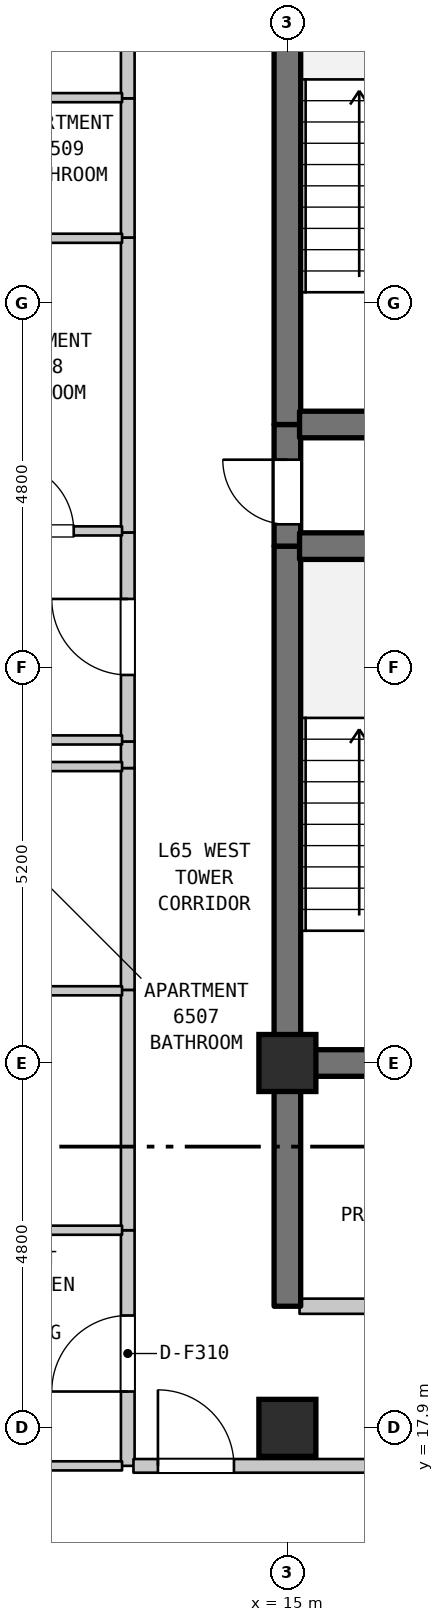
"""IFC4 building model, lengths in metres.
Left out: names, types, materials, properties, quantities, classifications, styles, units other than length and angle.
Written with IfcOpenShell. Run it as: python <this file> out.ifc"""

import sys

from ifc_helpers import new_model, si_unit, direction, frame, frame_2d, origin, origin_2d, place, context, subcontext, project, spatial, rectangle, extrude, element, fill, save


model = new_model("IFC4")
c1 = context("Model", 3, precision=1e-05, world=origin(), true_north=direction((0.0, 1.0)))
c2 = subcontext(c1, "Body", "Model", "MODEL_VIEW")
j1 = project(units=[si_unit("LENGTHUNIT", "METRE"), si_unit("PLANEANGLEUNIT", "RADIAN")], contexts=[c1])
p1 = place(None, origin())
s1 = spatial("IfcSite", under=j1, at=p1, CompositionType="ELEMENT")
p2 = place(p1, origin())
s2 = spatial("IfcBuilding", under=s1, at=p2, CompositionType="ELEMENT")
p3 = place(p2, frame((0.0, 0.0, 262.1)))
s3 = spatial("IfcBuildingStorey", under=s2, at=p3, CompositionType="ELEMENT", Elevation=262.1)
for number, where, z_axis, x_axis in (
    (1, (15.0, 17.9, 0.0), (0.0, 0.0, 1.0), (1.0, 0.0, 0.0)),
    (2, (15.0, 22.7, 0.0), (0.0, 0.0, 1.0), (1.0, 0.0, 0.0)),
):
    element("IfcColumn", number, at=place(p3, frame(where, z_axis=z_axis, x_axis=x_axis)), inside=s3, PredefinedType="COLUMN", context=c2, shape_type="SweptSolid", body=[
        extrude(rectangle(XDim=0.75, YDim=0.75, at=origin_2d()), origin(), (0.0, 0.0, 1.0), 3.7),
    ])
p4 = place(p3, frame((12.9, 17.4, 0.0), z_axis=(0.0, 0.0, 1.0), x_axis=(0.0, 1.0, 0.0)))
e3 = element("IfcWall", 3, at=p4, inside=s3, PredefinedType="STANDARD", context=c2, shape_type="SweptSolid", body=[
    extrude(rectangle(XDim=3.1, YDim=0.18, at=frame_2d((1.55, 0.0))), origin(), (0.0, 0.0, 1.0), 3.39),
])
p5 = place(p4, frame((0.978, 0.0, 0.0)))
e4 = element("IfcOpeningElement", 4, at=p5, cuts=e3, PredefinedType="OPENING", context=c2, shape_type="SweptSolid", body=[
    extrude(rectangle(XDim=1.0, YDim=2.15, at=frame_2d((0.5, 1.075))), frame((0.0, 0.1, 0.0), z_axis=(0.0, -1.0, 0.0), x_axis=(1.0, 0.0, 0.0)), (0.0, 0.0, 1.0), 0.2),
])
p6 = place(p3, frame((12.9, 20.5, 0.0), z_axis=(0.0, 0.0, 1.0), x_axis=(0.0, 1.0, 0.0)))
e5 = element("IfcWall", 5, at=p6, inside=s3, PredefinedType="STANDARD", context=c2, shape_type="SweptSolid", body=[
    extrude(rectangle(XDim=3.162, YDim=0.18, at=frame_2d((1.581, 0.0))), origin(), (0.0, 0.0, 1.0), 3.39),
])
p7 = place(p3, frame((12.9, 23.662, 0.0), z_axis=(0.0, 0.0, 1.0), x_axis=(0.0, 1.0, 0.0)))
e6 = element("IfcWall", 6, at=p7, inside=s3, PredefinedType="STANDARD", context=c2, shape_type="SweptSolid", body=[
    extrude(rectangle(XDim=2.918, YDim=0.18, at=frame_2d((1.459, 0.0))), origin(), (0.0, 0.0, 1.0), 3.39),
])
p8 = place(p3, frame((12.9, 26.58, 0.0), z_axis=(0.0, 0.0, 1.0), x_axis=(0.0, 1.0, 0.0)))
e7 = element("IfcWall", 7, at=p8, inside=s3, PredefinedType="STANDARD", context=c2, shape_type="SweptSolid", body=[
    extrude(rectangle(XDim=0.35, YDim=0.18, at=frame_2d((0.175, 0.0))), origin(), (0.0, 0.0, 1.0), 3.39),
])
p9 = place(p3, frame((12.9, 26.93, 0.0), z_axis=(0.0, 0.0, 1.0), x_axis=(0.0, 1.0, 0.0)))
e8 = element("IfcWall", 8, at=p9, inside=s3, PredefinedType="STANDARD", context=c2, shape_type="SweptSolid", body=[
    extrude(rectangle(XDim=2.75, YDim=0.18, at=frame_2d((1.375, 0.0))), origin(), (0.0, 0.0, 1.0), 3.39),
])
p10 = place(p9, frame((0.875, 0.0, 0.0)))
e9 = element("IfcOpeningElement", 9, at=p10, cuts=e8, PredefinedType="OPENING", context=c2, shape_type="SweptSolid", body=[
    extrude(rectangle(XDim=1.0, YDim=2.15, at=frame_2d((0.5, 1.075))), frame((0.0, 0.1, 0.0), z_axis=(0.0, -1.0, 0.0), x_axis=(1.0, 0.0, 0.0)), (0.0, 0.0, 1.0), 0.2),
])
p11 = place(p3, frame((12.9, 29.68, 0.0), z_axis=(0.0, 0.0, 1.0), x_axis=(0.0, 1.0, 0.0)))
e10 = element("IfcWall", 10, at=p11, inside=s3, PredefinedType="STANDARD", context=c2, shape_type="SweptSolid", body=[
    extrude(rectangle(XDim=3.88, YDim=0.18, at=frame_2d((1.94, 0.0))), origin(), (0.0, 0.0, 1.0), 3.39),
])
p12 = place(p3, frame((12.9, 33.56, 0.0), z_axis=(0.0, 0.0, 1.0), x_axis=(0.0, 1.0, 0.0)))
e11 = element("IfcWall", 11, at=p12, inside=s3, PredefinedType="STANDARD", context=c2, shape_type="SweptSolid", body=[
    extrude(rectangle(XDim=1.831, YDim=0.18, at=frame_2d((0.916, 0.0))), origin(), (0.0, 0.0, 1.0), 3.39),
])
p13 = place(p3, frame((12.9, 35.391, 0.0), z_axis=(0.0, 0.0, 1.0), x_axis=(0.0, 1.0, 0.0)))
e12 = element("IfcWall", 12, at=p13, inside=s3, PredefinedType="STANDARD", context=c2, shape_type="SweptSolid", body=[
    extrude(rectangle(XDim=1.831, YDim=0.18, at=frame_2d((0.916, 0.0))), origin(), (0.0, 0.0, 1.0), 3.39),
])
p14 = place(p3, frame((15.0, 19.5, 0.0), z_axis=(0.0, 0.0, 1.0), x_axis=(0.0, 1.0, 0.0)))
e13 = element("IfcWall", 13, at=p14, inside=s3, PredefinedType="SHEAR", context=c2, shape_type="SweptSolid", body=[
    extrude(rectangle(XDim=3.2, YDim=0.35, at=frame_2d((1.6, 0.0))), origin(), (0.0, 0.0, 1.0), 3.39),
])
p15 = place(p3, frame((15.0, 22.7, 0.0), z_axis=(0.0, 0.0, 1.0), x_axis=(0.0, 1.0, 0.0)))
e14 = element("IfcWall", 14, at=p15, inside=s3, PredefinedType="SHEAR", context=c2, shape_type="SweptSolid", body=[
    extrude(rectangle(XDim=6.8, YDim=0.35, at=frame_2d((3.4, 0.0))), origin(), (0.0, 0.0, 1.0), 3.39),
])
p16 = place(p3, frame((15.0, 29.5, 0.0), z_axis=(0.0, 0.0, 1.0), x_axis=(0.0, 1.0, 0.0)))
e15 = element("IfcWall", 15, at=p16, inside=s3, PredefinedType="SHEAR", context=c2, shape_type="SweptSolid", body=[
    extrude(rectangle(XDim=1.6, YDim=0.35, at=frame_2d((0.8, 0.0))), origin(), (0.0, 0.0, 1.0), 3.39),
])
p17 = place(p16, frame((0.287, 0.0, 0.0)))
e16 = element("IfcOpeningElement", 16, at=p17, cuts=e15, PredefinedType="OPENING", context=c2, shape_type="SweptSolid", body=[
    extrude(rectangle(XDim=0.85, YDim=2.1, at=frame_2d((0.425, 1.05))), frame((0.0, 0.185, 0.0), z_axis=(0.0, -1.0, 0.0), x_axis=(1.0, 0.0, 0.0)), (0.0, 0.0, 1.0), 0.37),
])
p18 = place(p3, frame((15.0, 31.1, 0.0), z_axis=(0.0, 0.0, 1.0), x_axis=(0.0, 1.0, 0.0)))
e17 = element("IfcWall", 17, at=p18, inside=s3, PredefinedType="SHEAR", context=c2, shape_type="SweptSolid", body=[
    extrude(rectangle(XDim=6.8, YDim=0.35, at=frame_2d((3.4, 0.0))), origin(), (0.0, 0.0, 1.0), 3.39),
])
p19 = place(p3, frame((8.973, 17.4, 0.0), z_axis=(0.0, 0.0, 1.0), x_axis=(1.0, 0.0, 0.0)))
e18 = element("IfcWall", 18, at=p19, inside=s3, PredefinedType="PARTITIONING", context=c2, shape_type="SweptSolid", body=[
    extrude(rectangle(XDim=3.852, YDim=0.12, at=frame_2d((1.926, 0.0))), origin(), (0.0, 0.0, 1.0), 3.39),
])
p20 = place(p3, frame((12.975, 17.4, 0.0), z_axis=(0.0, 0.0, 1.0), x_axis=(1.0, 0.0, 0.0)))
e19 = element("IfcWall", 19, at=p20, inside=s3, PredefinedType="STANDARD", context=c2, shape_type="SweptSolid", body=[
    extrude(rectangle(XDim=3.68, YDim=0.18, at=frame_2d((1.84, 0.0))), origin(), (0.0, 0.0, 1.0), 3.39),
])
p21 = place(p20, frame((0.322, 0.0, 0.0)))
e20 = element("IfcOpeningElement", 20, at=p21, cuts=e19, PredefinedType="OPENING", context=c2, shape_type="SweptSolid", body=[
    extrude(rectangle(XDim=1.0, YDim=2.15, at=frame_2d((0.5, 1.075))), frame((0.0, 0.1, 0.0), z_axis=(0.0, -1.0, 0.0), x_axis=(1.0, 0.0, 0.0)), (0.0, 0.0, 1.0), 0.2),
])
p22 = place(p3, frame((15.16, 19.5, 0.0), z_axis=(0.0, 0.0, 1.0), x_axis=(1.0, 0.0, 0.0)))
e21 = element("IfcWall", 21, at=p22, inside=s3, PredefinedType="STANDARD", context=c2, shape_type="SweptSolid", body=[
    extrude(rectangle(XDim=3.68, YDim=0.2, at=frame_2d((1.84, 0.0))), origin(), (0.0, 0.0, 1.0), 3.39),
])
p23 = place(p22, frame((1.39, 0.0, 0.0)))
e22 = element("IfcOpeningElement", 22, at=p23, cuts=e21, PredefinedType="OPENING", context=c2, shape_type="SweptSolid", body=[
    extrude(rectangle(XDim=0.9, YDim=2.15, at=frame_2d((0.45, 1.075))), frame((0.0, 0.11, 0.0), z_axis=(0.0, -1.0, 0.0), x_axis=(1.0, 0.0, 0.0)), (0.0, 0.0, 1.0), 0.22),
])
p24 = place(p3, frame((10.695, 20.5, 0.0), z_axis=(0.0, 0.0, 1.0), x_axis=(1.0, 0.0, 0.0)))
e23 = element("IfcWall", 23, at=p24, inside=s3, PredefinedType="PARTITIONING", context=c2, shape_type="SweptSolid", body=[
    extrude(rectangle(XDim=2.13, YDim=0.12, at=frame_2d((1.065, 0.0))), origin(), (0.0, 0.0, 1.0), 3.39),
])
p25 = place(p3, frame((15.16, 22.7, 0.0), z_axis=(0.0, 0.0, 1.0), x_axis=(1.0, 0.0, 0.0)))
e24 = element("IfcWall", 24, at=p25, inside=s3, PredefinedType="SHEAR", context=c2, shape_type="SweptSolid", body=[
    extrude(rectangle(XDim=3.68, YDim=0.35, at=frame_2d((1.84, 0.0))), origin(), (0.0, 0.0, 1.0), 3.39),
])
for number, where, z_axis, x_axis in (
    (25, (10.695, 23.65, 0.0), (0.0, 0.0, 1.0), (1.0, 0.0, 0.0)),
    (26, (10.695, 26.6, 0.0), (0.0, 0.0, 1.0), (1.0, 0.0, 0.0)),
):
    element("IfcWall", number, at=place(p3, frame(where, z_axis=z_axis, x_axis=x_axis)), inside=s3, PredefinedType="PARTITIONING", context=c2, shape_type="SweptSolid", body=[
        extrude(rectangle(XDim=2.13, YDim=0.12, at=frame_2d((1.065, 0.0))), origin(), (0.0, 0.0, 1.0), 3.39),
    ])
p26 = place(p3, frame((9.175, 26.95, 0.0), z_axis=(0.0, 0.0, 1.0), x_axis=(1.0, 0.0, 0.0)))
e27 = element("IfcWall", 27, at=p26, inside=s3, PredefinedType="PARTITIONING", context=c2, shape_type="SweptSolid", body=[
    extrude(rectangle(XDim=3.65, YDim=0.12, at=frame_2d((1.825, 0.0))), origin(), (0.0, 0.0, 1.0), 3.39),
])
p27 = place(p3, frame((15.16, 29.5, 0.0), z_axis=(0.0, 0.0, 1.0), x_axis=(1.0, 0.0, 0.0)))
e28 = element("IfcWall", 28, at=p27, inside=s3, PredefinedType="SHEAR", context=c2, shape_type="SweptSolid", body=[
    extrude(rectangle(XDim=3.68, YDim=0.35, at=frame_2d((1.84, 0.0))), origin(), (0.0, 0.0, 1.0), 3.39),
])
p28 = place(p3, frame((10.623, 29.7, 0.0), z_axis=(0.0, 0.0, 1.0), x_axis=(1.0, 0.0, 0.0)))
e29 = element("IfcWall", 29, at=p28, inside=s3, PredefinedType="PARTITIONING", context=c2, shape_type="SweptSolid", body=[
    extrude(rectangle(XDim=2.202, YDim=0.12, at=frame_2d((1.101, 0.0))), origin(), (0.0, 0.0, 1.0), 3.39),
])
p29 = place(p28, frame((0.666, 0.0, 0.0)))
e30 = element("IfcOpeningElement", 30, at=p29, cuts=e29, PredefinedType="OPENING", context=c2, shape_type="SweptSolid", body=[
    extrude(rectangle(XDim=0.9, YDim=2.1, at=frame_2d((0.45, 1.05))), frame((0.0, 0.07, 0.0), z_axis=(0.0, -1.0, 0.0), x_axis=(1.0, 0.0, 0.0)), (0.0, 0.0, 1.0), 0.14),
])
p30 = place(p3, frame((15.16, 31.1, 0.0), z_axis=(0.0, 0.0, 1.0), x_axis=(1.0, 0.0, 0.0)))
e31 = element("IfcWall", 31, at=p30, inside=s3, PredefinedType="SHEAR", context=c2, shape_type="SweptSolid", body=[
    extrude(rectangle(XDim=3.68, YDim=0.35, at=frame_2d((1.84, 0.0))), origin(), (0.0, 0.0, 1.0), 3.39),
])
for number, where, z_axis, x_axis in (
    (32, (10.645, 33.55, 0.0), (0.0, 0.0, 1.0), (1.0, 0.0, 0.0)),
    (33, (10.645, 35.4, 0.0), (0.0, 0.0, 1.0), (1.0, 0.0, 0.0)),
):
    element("IfcWall", number, at=place(p3, frame(where, z_axis=z_axis, x_axis=x_axis)), inside=s3, PredefinedType="PARTITIONING", context=c2, shape_type="SweptSolid", body=[
        extrude(rectangle(XDim=2.18, YDim=0.12, at=frame_2d((1.09, 0.0))), origin(), (0.0, 0.0, 1.0), 3.39),
    ])
p31 = place(p5, origin())
e34 = element("IfcDoor", 34, at=p31, inside=s3, OperationType="SINGLE_SWING_LEFT", PredefinedType="DOOR", context=c2, shape_type="SweptSolid", body=[
    extrude(rectangle(XDim=1.0, YDim=2.15, at=frame_2d((0.5, 1.075))), frame((0.0, 0.025, 0.0), z_axis=(0.0, -1.0, 0.0), x_axis=(1.0, 0.0, 0.0)), (0.0, 0.0, 1.0), 0.05),
])
fill(e4, e34)
p32 = place(p10, origin())
e35 = element("IfcDoor", 35, at=p32, inside=s3, OperationType="SINGLE_SWING_RIGHT", PredefinedType="DOOR", context=c2, shape_type="SweptSolid", body=[
    extrude(rectangle(XDim=1.0, YDim=2.15, at=frame_2d((0.5, 1.075))), frame((0.0, 0.025, 0.0), z_axis=(0.0, -1.0, 0.0), x_axis=(1.0, 0.0, 0.0)), (0.0, 0.0, 1.0), 0.05),
])
fill(e9, e35)
p33 = place(p17, origin())
e36 = element("IfcDoor", 36, at=p33, inside=s3, OperationType="SINGLE_SWING_RIGHT", PredefinedType="DOOR", context=c2, shape_type="SweptSolid", body=[
    extrude(rectangle(XDim=0.85, YDim=2.1, at=frame_2d((0.425, 1.05))), frame((0.0, 0.025, 0.0), z_axis=(0.0, -1.0, 0.0), x_axis=(1.0, 0.0, 0.0)), (0.0, 0.0, 1.0), 0.05),
])
fill(e16, e36)
p34 = place(p21, origin())
e37 = element("IfcDoor", 37, at=p34, inside=s3, OperationType="SINGLE_SWING_LEFT", PredefinedType="DOOR", context=c2, shape_type="SweptSolid", body=[
    extrude(rectangle(XDim=1.0, YDim=2.15, at=frame_2d((0.5, 1.075))), frame((0.0, 0.025, 0.0), z_axis=(0.0, -1.0, 0.0), x_axis=(1.0, 0.0, 0.0)), (0.0, 0.0, 1.0), 0.05),
])
fill(e20, e37)
p35 = place(p29, origin())
e38 = element("IfcDoor", 38, at=p35, inside=s3, OperationType="SINGLE_SWING_LEFT", PredefinedType="DOOR", context=c2, shape_type="SweptSolid", body=[
    extrude(rectangle(XDim=0.9, YDim=2.1, at=frame_2d((0.45, 1.05))), frame((0.0, 0.025, 0.0), z_axis=(0.0, -1.0, 0.0), x_axis=(1.0, 0.0, 0.0)), (0.0, 0.0, 1.0), 0.05),
])
fill(e30, e38)
save(model, sys.argv[1])
